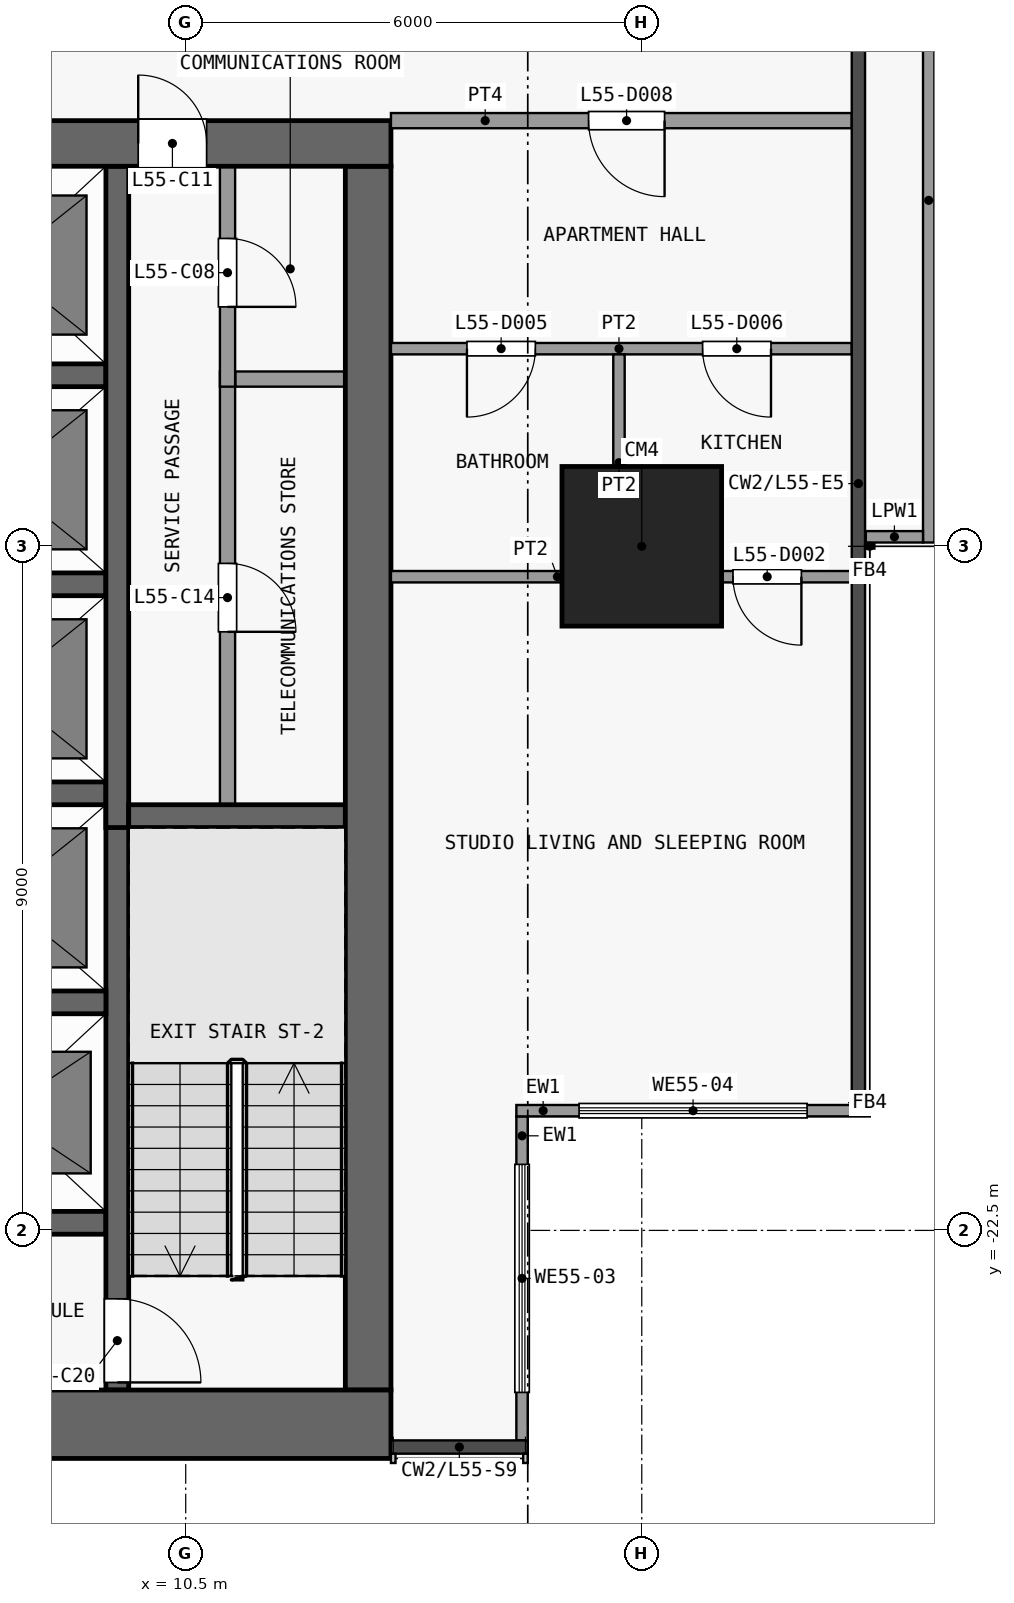
"""IFC4 building model, lengths in metres.
Left out: names, types, materials, properties, quantities, classifications, styles, units other than length and angle.
Written with IfcOpenShell. Run it as: python <this file> out.ifc"""

import sys

from ifc_helpers import new_model, si_unit, direction, frame, frame_2d, origin, origin_2d, place, context, subcontext, project, spatial, rectangle, extrude, element, fill, save


model = new_model("IFC4")
c1 = context("Model", 3, precision=1e-05, world=origin(), true_north=direction((0.0, 1.0)))
c2 = subcontext(c1, "Body", "Model", "MODEL_VIEW")
j1 = project(units=[si_unit("LENGTHUNIT", "METRE"), si_unit("PLANEANGLEUNIT", "RADIAN")], contexts=[c1])
p1 = place(None, origin())
s1 = spatial("IfcSite", under=j1, at=p1, CompositionType="ELEMENT")
p2 = place(p1, origin())
s2 = spatial("IfcBuilding", under=s1, at=p2, CompositionType="ELEMENT")
p3 = place(p2, frame((0.0, 0.0, 219.5)))
s3 = spatial("IfcBuildingStorey", under=s2, at=p3, CompositionType="ELEMENT", Elevation=219.5)
p4 = place(p3, frame((16.5, -13.5, 0.0), z_axis=(0.0, 0.0, 1.0), x_axis=(1.0, 0.0, 0.0)))
e1 = element("IfcColumn", 1, at=p4, inside=s3, PredefinedType="COLUMN", context=c2, shape_type="SweptSolid", body=[
    extrude(rectangle(XDim=2.1, YDim=2.1, at=origin_2d()), origin(), (0.0, 0.0, 1.0), 3.6),
])
p5 = place(p3, frame((-13.2, -25.05, 0.0), z_axis=(0.0, 0.0, 1.0), x_axis=(1.0, 0.0, 0.0)))
e2 = element("IfcWall", 2, at=p5, inside=s3, PredefinedType="SHEAR", context=c2, shape_type="SweptSolid", body=[
    extrude(rectangle(XDim=26.4, YDim=0.9, at=frame_2d((13.2, 0.0))), origin(), (0.0, 0.0, 1.0), 3.3),
])
p6 = place(p3, frame((-13.2, -8.2, 0.0), z_axis=(0.0, 0.0, 1.0), x_axis=(1.0, 0.0, 0.0)))
e3 = element("IfcWall", 3, at=p6, inside=s3, PredefinedType="SHEAR", context=c2, shape_type="SweptSolid", body=[
    extrude(rectangle(XDim=26.4, YDim=0.6, at=frame_2d((13.2, 0.0))), origin(), (0.0, 0.0, 1.0), 3.3),
])
p7 = place(p6, frame((7.5, 0.0, 0.0)))
e4 = element("IfcOpeningElement", 4, at=p7, cuts=e3, PredefinedType="OPENING", context=c2, shape_type="SweptSolid", body=[
    extrude(rectangle(XDim=1.8, YDim=2.1, at=frame_2d((0.9, 1.05))), frame((0.0, 0.31, 0.0), z_axis=(0.0, -1.0, 0.0), x_axis=(1.0, 0.0, 0.0)), (0.0, 0.0, 1.0), 0.62),
])
p8 = place(p6, frame((17.1, 0.0, 0.0)))
e5 = element("IfcOpeningElement", 5, at=p8, cuts=e3, PredefinedType="OPENING", context=c2, shape_type="SweptSolid", body=[
    extrude(rectangle(XDim=1.8, YDim=2.1, at=frame_2d((0.9, 1.05))), frame((0.0, 0.31, 0.0), z_axis=(0.0, -1.0, 0.0), x_axis=(1.0, 0.0, 0.0)), (0.0, 0.0, 1.0), 0.62),
])
p9 = place(p6, frame((2.425, 0.0, 0.0)))
e6 = element("IfcOpeningElement", 6, at=p9, cuts=e3, PredefinedType="OPENING", context=c2, shape_type="SweptSolid", body=[
    extrude(rectangle(XDim=0.9, YDim=2.1, at=frame_2d((0.45, 1.05))), frame((0.0, 0.31, 0.0), z_axis=(0.0, -1.0, 0.0), x_axis=(1.0, 0.0, 0.0)), (0.0, 0.0, 1.0), 0.62),
])
p10 = place(p6, frame((23.075, 0.0, 0.0)))
e7 = element("IfcOpeningElement", 7, at=p10, cuts=e3, PredefinedType="OPENING", context=c2, shape_type="SweptSolid", body=[
    extrude(rectangle(XDim=0.9, YDim=2.1, at=frame_2d((0.45, 1.05))), frame((0.0, 0.31, 0.0), z_axis=(0.0, -1.0, 0.0), x_axis=(1.0, 0.0, 0.0)), (0.0, 0.0, 1.0), 0.62),
])
p11 = place(p3, frame((12.9, -24.6, 0.0), z_axis=(0.0, 0.0, 1.0), x_axis=(0.0, 1.0, 0.0)))
e8 = element("IfcWall", 8, at=p11, inside=s3, PredefinedType="SHEAR", context=c2, shape_type="SweptSolid", body=[
    extrude(rectangle(XDim=16.1, YDim=0.6, at=frame_2d((8.05, 0.0))), origin(), (0.0, 0.0, 1.0), 3.3),
])
for number, where, z_axis, x_axis in (
    (9, (6.65, -22.4, 0.0), (0.0, 0.0, 1.0), (1.0, 0.0, 0.0)),
    (10, (6.65, -19.5, 0.0), (0.0, 0.0, 1.0), (1.0, 0.0, 0.0)),
):
    element("IfcWall", number, at=place(p3, frame(where, z_axis=z_axis, x_axis=x_axis)), inside=s3, PredefinedType="SHEAR", context=c2, shape_type="SweptSolid", body=[
        extrude(rectangle(XDim=2.8, YDim=0.3, at=frame_2d((1.4, 0.0))), origin(), (0.0, 0.0, 1.0), 3.3),
    ])
p12 = place(p3, frame((9.75, -17.05, 0.0), z_axis=(0.0, 0.0, 1.0), x_axis=(1.0, 0.0, 0.0)))
e11 = element("IfcWall", 11, at=p12, inside=s3, PredefinedType="SHEAR", context=c2, shape_type="SweptSolid", body=[
    extrude(rectangle(XDim=2.85, YDim=0.3, at=frame_2d((1.425, 0.0))), origin(), (0.0, 0.0, 1.0), 3.3),
])
for number, where, z_axis, x_axis in (
    (12, (6.65, -16.75, 0.0), (0.0, 0.0, 1.0), (1.0, 0.0, 0.0)),
    (13, (6.65, -14.0, 0.0), (0.0, 0.0, 1.0), (1.0, 0.0, 0.0)),
):
    element("IfcWall", number, at=place(p3, frame(where, z_axis=z_axis, x_axis=x_axis)), inside=s3, PredefinedType="SHEAR", context=c2, shape_type="SweptSolid", body=[
        extrude(rectangle(XDim=2.8, YDim=0.3, at=frame_2d((1.4, 0.0))), origin(), (0.0, 0.0, 1.0), 3.3),
    ])
p13 = place(p3, frame((11.15, -11.3, 0.0), z_axis=(0.0, 0.0, 1.0), x_axis=(1.0, 0.0, 0.0)))
e14 = element("IfcWall", 14, at=p13, inside=s3, PredefinedType="PARTITIONING", context=c2, shape_type="SweptSolid", body=[
    extrude(rectangle(XDim=1.45, YDim=0.2, at=frame_2d((0.725, 0.0))), origin(), (0.0, 0.0, 1.0), 3.3),
])
p14 = place(p3, frame((6.65, -11.25, 0.0), z_axis=(0.0, 0.0, 1.0), x_axis=(1.0, 0.0, 0.0)))
e15 = element("IfcWall", 15, at=p14, inside=s3, PredefinedType="SHEAR", context=c2, shape_type="SweptSolid", body=[
    extrude(rectangle(XDim=2.8, YDim=0.3, at=frame_2d((1.4, 0.0))), origin(), (0.0, 0.0, 1.0), 3.3),
])
p15 = place(p3, frame((9.6, -16.9, 0.0), z_axis=(0.0, 0.0, 1.0), x_axis=(0.0, -1.0, 0.0)))
e16 = element("IfcWall", 16, at=p15, inside=s3, PredefinedType="SHEAR", context=c2, shape_type="SweptSolid", body=[
    extrude(rectangle(XDim=7.7, YDim=0.3, at=frame_2d((3.85, 0.0))), origin(), (0.0, 0.0, 1.0), 3.3),
])
p16 = place(p15, frame((6.5, 0.0, 0.0)))
e17 = element("IfcOpeningElement", 17, at=p16, cuts=e16, PredefinedType="OPENING", context=c2, shape_type="SweptSolid", body=[
    extrude(rectangle(XDim=1.1, YDim=2.1, at=frame_2d((0.55, 1.05))), frame((0.0, 0.16, 0.0), z_axis=(0.0, -1.0, 0.0), x_axis=(1.0, 0.0, 0.0)), (0.0, 0.0, 1.0), 0.32),
])
p17 = place(p3, frame((9.6, -17.2, 0.0), z_axis=(0.0, 0.0, 1.0), x_axis=(0.0, 1.0, 0.0)))
e18 = element("IfcWall", 18, at=p17, inside=s3, PredefinedType="SHEAR", context=c2, shape_type="SweptSolid", body=[
    extrude(rectangle(XDim=8.7, YDim=0.3, at=frame_2d((4.35, 0.0))), origin(), (0.0, 0.0, 1.0), 3.3),
])
p18 = place(p3, frame((11.05, -11.2, 0.0), z_axis=(0.0, 0.0, 1.0), x_axis=(0.0, -1.0, 0.0)))
e19 = element("IfcWall", 19, at=p18, inside=s3, PredefinedType="PARTITIONING", context=c2, shape_type="SweptSolid", body=[
    extrude(rectangle(XDim=5.7, YDim=0.2, at=frame_2d((2.85, 0.0))), origin(), (0.0, 0.0, 1.0), 3.3),
])
p19 = place(p18, frame((2.525, 0.0, 0.0)))
e20 = element("IfcOpeningElement", 20, at=p19, cuts=e19, PredefinedType="OPENING", context=c2, shape_type="SweptSolid", body=[
    extrude(rectangle(XDim=0.9, YDim=2.1, at=frame_2d((0.45, 1.05))), frame((0.0, 0.11, 0.0), z_axis=(0.0, -1.0, 0.0), x_axis=(1.0, 0.0, 0.0)), (0.0, 0.0, 1.0), 0.22),
])
p20 = place(p3, frame((11.05, -8.5, 0.0), z_axis=(0.0, 0.0, 1.0), x_axis=(0.0, -1.0, 0.0)))
e21 = element("IfcWall", 21, at=p20, inside=s3, PredefinedType="PARTITIONING", context=c2, shape_type="SweptSolid", body=[
    extrude(rectangle(XDim=2.9, YDim=0.2, at=frame_2d((1.45, 0.0))), origin(), (0.0, 0.0, 1.0), 3.3),
])
p21 = place(p20, frame((0.95, 0.0, 0.0)))
e22 = element("IfcOpeningElement", 22, at=p21, cuts=e21, PredefinedType="OPENING", context=c2, shape_type="SweptSolid", body=[
    extrude(rectangle(XDim=0.9, YDim=2.1, at=frame_2d((0.45, 1.05))), frame((0.0, 0.11, 0.0), z_axis=(0.0, -1.0, 0.0), x_axis=(1.0, 0.0, 0.0)), (0.0, 0.0, 1.0), 0.22),
])
p22 = place(p3, frame((14.925, -21.0, 0.0), z_axis=(0.0, 0.0, 1.0), x_axis=(0.0, -1.0, 0.0)))
e23 = element("IfcWall", 23, at=p22, inside=s3, PredefinedType="SOLIDWALL", context=c2, shape_type="SweptSolid", body=[
    extrude(rectangle(XDim=4.262, YDim=0.15, at=frame_2d((2.131, 0.0))), origin(), (0.0, 0.0, 1.0), 3.3),
])
p23 = place(p22, frame((0.631, 0.0, 0.9)))
e24 = element("IfcOpeningElement", 24, at=p23, cuts=e23, PredefinedType="OPENING", context=c2, shape_type="SweptSolid", body=[
    extrude(rectangle(XDim=3.0, YDim=2.4, at=frame_2d((1.5, 1.2))), frame((0.0, 0.085, 0.0), z_axis=(0.0, -1.0, 0.0), x_axis=(1.0, 0.0, 0.0)), (0.0, 0.0, 1.0), 0.17),
])
p24 = place(p3, frame((19.5, -20.925, 0.0), z_axis=(0.0, 0.0, 1.0), x_axis=(-1.0, 0.0, 0.0)))
e25 = element("IfcWall", 25, at=p24, inside=s3, PredefinedType="SOLIDWALL", context=c2, shape_type="SweptSolid", body=[
    extrude(rectangle(XDim=4.65, YDim=0.15, at=frame_2d((2.325, 0.0))), origin(), (0.0, 0.0, 1.0), 3.3),
])
p25 = place(p24, frame((0.825, 0.0, 0.9)))
e26 = element("IfcOpeningElement", 26, at=p25, cuts=e25, PredefinedType="OPENING", context=c2, shape_type="SweptSolid", body=[
    extrude(rectangle(XDim=3.0, YDim=2.4, at=frame_2d((1.5, 1.2))), frame((0.0, 0.085, 0.0), z_axis=(0.0, -1.0, 0.0), x_axis=(1.0, 0.0, 0.0)), (0.0, 0.0, 1.0), 0.17),
])
p26 = place(p3, frame((20.275, -4.448, 0.0), z_axis=(0.0, 0.0, 1.0), x_axis=(0.0, -1.0, 0.0)))
e27 = element("IfcWall", 27, at=p26, inside=s3, PredefinedType="PARAPET", context=c2, shape_type="SweptSolid", body=[
    extrude(rectangle(XDim=9.002, YDim=0.15, at=frame_2d((4.501, 0.0))), origin(), (0.0, 0.0, 1.0), 1.15),
])
p27 = place(p3, frame((20.2, -13.375, 0.0), z_axis=(0.0, 0.0, 1.0), x_axis=(-1.0, 0.0, 0.0)))
e28 = element("IfcWall", 28, at=p27, inside=s3, PredefinedType="PARAPET", context=c2, shape_type="SweptSolid", body=[
    extrude(rectangle(XDim=0.752, YDim=0.15, at=frame_2d((0.376, 0.0))), origin(), (0.0, 0.0, 1.0), 1.15),
])
p28 = place(p3, frame((13.2, -13.9, 0.0), z_axis=(0.0, 0.0, 1.0), x_axis=(1.0, 0.0, 0.0)))
e29 = element("IfcWall", 29, at=p28, inside=s3, PredefinedType="PARTITIONING", context=c2, shape_type="SweptSolid", body=[
    extrude(rectangle(XDim=6.062, YDim=0.15, at=frame_2d((3.031, 0.0))), origin(), (0.0, 0.0, 1.0), 3.3),
])
p29 = place(p28, frame((4.5, 0.0, 0.0)))
e30 = element("IfcOpeningElement", 30, at=p29, cuts=e29, PredefinedType="OPENING", context=c2, shape_type="SweptSolid", body=[
    extrude(rectangle(XDim=0.9, YDim=2.1, at=frame_2d((0.45, 1.05))), frame((0.0, 0.085, 0.0), z_axis=(0.0, -1.0, 0.0), x_axis=(1.0, 0.0, 0.0)), (0.0, 0.0, 1.0), 0.17),
])
p30 = place(p3, frame((13.2, -10.9, 0.0), z_axis=(0.0, 0.0, 1.0), x_axis=(1.0, 0.0, 0.0)))
e31 = element("IfcWall", 31, at=p30, inside=s3, PredefinedType="PARTITIONING", context=c2, shape_type="SweptSolid", body=[
    extrude(rectangle(XDim=6.062, YDim=0.15, at=frame_2d((3.031, 0.0))), origin(), (0.0, 0.0, 1.0), 3.3),
])
p31 = place(p30, frame((1.0, 0.0, 0.0)))
e32 = element("IfcOpeningElement", 32, at=p31, cuts=e31, PredefinedType="OPENING", context=c2, shape_type="SweptSolid", body=[
    extrude(rectangle(XDim=0.9, YDim=2.1, at=frame_2d((0.45, 1.05))), frame((0.0, 0.085, 0.0), z_axis=(0.0, -1.0, 0.0), x_axis=(1.0, 0.0, 0.0)), (0.0, 0.0, 1.0), 0.17),
])
p32 = place(p30, frame((4.1, 0.0, 0.0)))
e33 = element("IfcOpeningElement", 33, at=p32, cuts=e31, PredefinedType="OPENING", context=c2, shape_type="SweptSolid", body=[
    extrude(rectangle(XDim=0.9, YDim=2.1, at=frame_2d((0.45, 1.05))), frame((0.0, 0.085, 0.0), z_axis=(0.0, -1.0, 0.0), x_axis=(1.0, 0.0, 0.0)), (0.0, 0.0, 1.0), 0.17),
])
p33 = place(p3, frame((13.2, -7.9, 0.0), z_axis=(0.0, 0.0, 1.0), x_axis=(1.0, 0.0, 0.0)))
e34 = element("IfcWall", 34, at=p33, inside=s3, PredefinedType="PARTITIONING", context=c2, shape_type="SweptSolid", body=[
    extrude(rectangle(XDim=6.062, YDim=0.2, at=frame_2d((3.031, 0.0))), origin(), (0.0, 0.0, 1.0), 3.3),
])
p34 = place(p33, frame((2.6, 0.0, 0.0)))
e35 = element("IfcOpeningElement", 35, at=p34, cuts=e34, PredefinedType="OPENING", context=c2, shape_type="SweptSolid", body=[
    extrude(rectangle(XDim=1.0, YDim=2.1, at=frame_2d((0.5, 1.05))), frame((0.0, 0.11, 0.0), z_axis=(0.0, -1.0, 0.0), x_axis=(1.0, 0.0, 0.0)), (0.0, 0.0, 1.0), 0.22),
])
p35 = place(p3, frame((16.2, -13.825, 0.0), z_axis=(0.0, 0.0, 1.0), x_axis=(0.0, 1.0, 0.0)))
e36 = element("IfcWall", 36, at=p35, inside=s3, PredefinedType="PARTITIONING", context=c2, shape_type="SweptSolid", body=[
    extrude(rectangle(XDim=2.85, YDim=0.15, at=frame_2d((1.425, 0.0))), origin(), (0.0, 0.0, 1.0), 3.3),
])
p36 = place(p21, origin())
e37 = element("IfcDoor", 37, at=p36, inside=s3, OperationType="SINGLE_SWING_RIGHT", PredefinedType="DOOR", context=c2, shape_type="SweptSolid", body=[
    extrude(rectangle(XDim=0.9, YDim=2.1, at=frame_2d((0.45, 1.05))), frame((0.0, 0.025, 0.0), z_axis=(0.0, -1.0, 0.0), x_axis=(1.0, 0.0, 0.0)), (0.0, 0.0, 1.0), 0.05),
])
fill(e22, e37)
p37 = place(p10, origin())
e38 = element("IfcDoor", 38, at=p37, inside=s3, OperationType="SINGLE_SWING_LEFT", PredefinedType="DOOR", context=c2, shape_type="SweptSolid", body=[
    extrude(rectangle(XDim=0.9, YDim=2.1, at=frame_2d((0.45, 1.05))), frame((0.0, 0.025, 0.0), z_axis=(0.0, -1.0, 0.0), x_axis=(1.0, 0.0, 0.0)), (0.0, 0.0, 1.0), 0.05),
])
fill(e7, e38)
p38 = place(p19, origin())
e39 = element("IfcDoor", 39, at=p38, inside=s3, OperationType="SINGLE_SWING_RIGHT", PredefinedType="DOOR", context=c2, shape_type="SweptSolid", body=[
    extrude(rectangle(XDim=0.9, YDim=2.1, at=frame_2d((0.45, 1.05))), frame((0.0, 0.025, 0.0), z_axis=(0.0, -1.0, 0.0), x_axis=(1.0, 0.0, 0.0)), (0.0, 0.0, 1.0), 0.05),
])
fill(e20, e39)
p39 = place(p16, origin())
e40 = element("IfcDoor", 40, at=p39, inside=s3, OperationType="SINGLE_SWING_RIGHT", PredefinedType="DOOR", context=c2, shape_type="SweptSolid", body=[
    extrude(rectangle(XDim=1.1, YDim=2.1, at=frame_2d((0.55, 1.05))), frame((0.0, 0.025, 0.0), z_axis=(0.0, -1.0, 0.0), x_axis=(1.0, 0.0, 0.0)), (0.0, 0.0, 1.0), 0.05),
])
fill(e17, e40)
p40 = place(p23, origin())
e41 = element("IfcWindow", 41, at=p40, inside=s3, PartitioningType="SINGLE_PANEL", PredefinedType="WINDOW", context=c2, shape_type="SweptSolid", body=[
    extrude(rectangle(XDim=3.0, YDim=2.4, at=frame_2d((1.5, 1.2))), frame((0.0, 0.03, 0.0), z_axis=(0.0, -1.0, 0.0), x_axis=(1.0, 0.0, 0.0)), (0.0, 0.0, 1.0), 0.06),
])
fill(e24, e41)
p41 = place(p25, origin())
e42 = element("IfcWindow", 42, at=p41, inside=s3, PartitioningType="SINGLE_PANEL", PredefinedType="WINDOW", context=c2, shape_type="SweptSolid", body=[
    extrude(rectangle(XDim=3.0, YDim=2.4, at=frame_2d((1.5, 1.2))), frame((0.0, 0.03, 0.0), z_axis=(0.0, -1.0, 0.0), x_axis=(1.0, 0.0, 0.0)), (0.0, 0.0, 1.0), 0.06),
])
fill(e26, e42)
p42 = place(p29, origin())
e43 = element("IfcDoor", 43, at=p42, inside=s3, OperationType="SINGLE_SWING_RIGHT", PredefinedType="DOOR", context=c2, shape_type="SweptSolid", body=[
    extrude(rectangle(XDim=0.9, YDim=2.1, at=frame_2d((0.45, 1.05))), frame((0.0, 0.025, 0.0), z_axis=(0.0, -1.0, 0.0), x_axis=(1.0, 0.0, 0.0)), (0.0, 0.0, 1.0), 0.05),
])
fill(e30, e43)
p43 = place(p31, origin())
e44 = element("IfcDoor", 44, at=p43, inside=s3, OperationType="SINGLE_SWING_LEFT", PredefinedType="DOOR", context=c2, shape_type="SweptSolid", body=[
    extrude(rectangle(XDim=0.9, YDim=2.1, at=frame_2d((0.45, 1.05))), frame((0.0, 0.025, 0.0), z_axis=(0.0, -1.0, 0.0), x_axis=(1.0, 0.0, 0.0)), (0.0, 0.0, 1.0), 0.05),
])
fill(e32, e44)
p44 = place(p32, origin())
e45 = element("IfcDoor", 45, at=p44, inside=s3, OperationType="SINGLE_SWING_RIGHT", PredefinedType="DOOR", context=c2, shape_type="SweptSolid", body=[
    extrude(rectangle(XDim=0.9, YDim=2.1, at=frame_2d((0.45, 1.05))), frame((0.0, 0.025, 0.0), z_axis=(0.0, -1.0, 0.0), x_axis=(1.0, 0.0, 0.0)), (0.0, 0.0, 1.0), 0.05),
])
fill(e33, e45)
p45 = place(p34, origin())
e46 = element("IfcDoor", 46, at=p45, inside=s3, OperationType="SINGLE_SWING_RIGHT", PredefinedType="DOOR", context=c2, shape_type="SweptSolid", body=[
    extrude(rectangle(XDim=1.0, YDim=2.1, at=frame_2d((0.5, 1.05))), frame((0.0, 0.025, 0.0), z_axis=(0.0, -1.0, 0.0), x_axis=(1.0, 0.0, 0.0)), (0.0, 0.0, 1.0), 0.05),
])
fill(e35, e46)
save(model, sys.argv[1])
